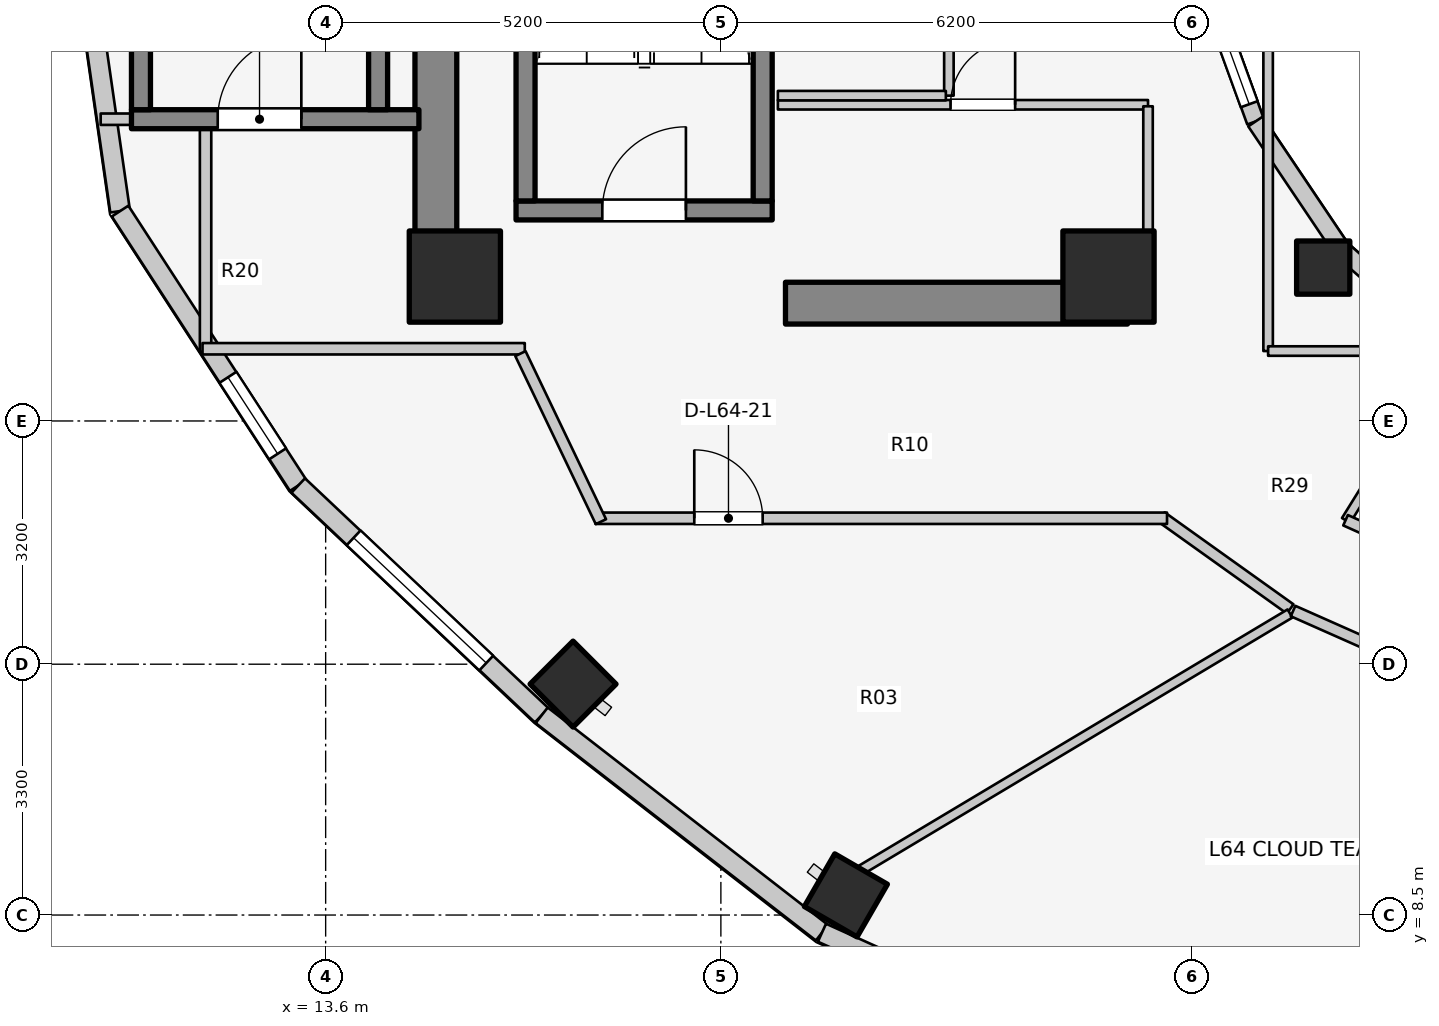
"""IFC4 building model, lengths in metres.
Left out: names, types, materials, properties, quantities, classifications, styles, units other than length and angle.
Written with IfcOpenShell. Run it as: python <this file> out.ifc"""

import sys

from ifc_helpers import new_model, si_unit, direction, frame, frame_2d, origin, origin_2d, place, context, subcontext, project, spatial, rectangle, extrude, element, fill, save


model = new_model("IFC4")
c1 = context("Model", 3, precision=1e-05, world=origin(), true_north=direction((0.0, 1.0)))
c2 = subcontext(c1, "Body", "Model", "MODEL_VIEW")
j1 = project(units=[si_unit("LENGTHUNIT", "METRE"), si_unit("PLANEANGLEUNIT", "RADIAN")], contexts=[c1])
p1 = place(None, origin())
s1 = spatial("IfcSite", under=j1, at=p1, CompositionType="ELEMENT")
p2 = place(p1, origin())
s2 = spatial("IfcBuilding", under=s1, at=p2, CompositionType="ELEMENT")
p3 = place(p2, frame((0.0, 0.0, 210.9)))
s3 = spatial("IfcBuildingStorey", under=s2, at=p3, CompositionType="ELEMENT", Elevation=210.9)
p4 = place(p3, frame((15.05, 17.05, 0.0), z_axis=(0.0, 0.0, 1.0), x_axis=(0.0, 1.0, 0.0)))
e1 = element("IfcWall", 1, at=p4, inside=s3, PredefinedType="SHEAR", context=c2, shape_type="SweptSolid", body=[
    extrude(rectangle(XDim=12.8, YDim=0.55, at=frame_2d((6.4, 0.0))), origin(), (0.0, 0.0, 1.0), 3.1),
])
p5 = place(p3, frame((19.65, 16.55, 0.0), z_axis=(0.0, 0.0, 1.0), x_axis=(1.0, 0.0, 0.0)))
e2 = element("IfcWall", 2, at=p5, inside=s3, PredefinedType="SHEAR", context=c2, shape_type="SweptSolid", body=[
    extrude(rectangle(XDim=4.5, YDim=0.55, at=frame_2d((2.25, 0.0))), origin(), (0.0, 0.0, 1.0), 3.1),
])
p6 = place(p3, frame((16.105, 17.77, 0.0), z_axis=(0.0, 0.0, 1.0), x_axis=(1.0, 0.0, 0.0)))
e3 = element("IfcWall", 3, at=p6, inside=s3, PredefinedType="SOLIDWALL", context=c2, shape_type="SweptSolid", body=[
    extrude(rectangle(XDim=3.37, YDim=0.25, at=frame_2d((1.685, 0.0))), origin(), (0.0, 0.0, 1.0), 3.1),
])
p7 = place(p6, frame((1.135, 0.0, 0.0)))
e4 = element("IfcOpeningElement", 4, at=p7, cuts=e3, PredefinedType="OPENING", context=c2, shape_type="SweptSolid", body=[
    extrude(rectangle(XDim=1.1, YDim=2.1, at=frame_2d((0.55, 1.05))), frame((0.0, 0.135, 0.0), z_axis=(0.0, -1.0, 0.0), x_axis=(1.0, 0.0, 0.0)), (0.0, 0.0, 1.0), 0.27),
])
for number, where, z_axis, x_axis in (
    (5, (16.23, 17.895, 0.0), (0.0, 0.0, 1.0), (0.0, 1.0, 0.0)),
    (6, (19.35, 17.895, 0.0), (0.0, 0.0, 1.0), (0.0, 1.0, 0.0)),
):
    element("IfcWall", number, at=place(p3, frame(where, z_axis=z_axis, x_axis=x_axis)), inside=s3, PredefinedType="SOLIDWALL", context=c2, shape_type="SweptSolid", body=[
        extrude(rectangle(XDim=7.81, YDim=0.25, at=frame_2d((3.905, 0.0))), origin(), (0.0, 0.0, 1.0), 3.1),
    ])
p8 = place(p3, frame((11.045, 18.97, 0.0), z_axis=(0.0, 0.0, 1.0), x_axis=(1.0, 0.0, 0.0)))
e7 = element("IfcWall", 7, at=p8, inside=s3, PredefinedType="SOLIDWALL", context=c2, shape_type="SweptSolid", body=[
    extrude(rectangle(XDim=3.782, YDim=0.25, at=frame_2d((1.891, 0.0))), origin(), (0.0, 0.0, 1.0), 3.1),
])
p9 = place(p8, frame((1.135, 0.0, 0.0)))
e8 = element("IfcOpeningElement", 8, at=p9, cuts=e7, PredefinedType="OPENING", context=c2, shape_type="SweptSolid", body=[
    extrude(rectangle(XDim=1.1, YDim=2.1, at=frame_2d((0.55, 1.05))), frame((0.0, 0.135, 0.0), z_axis=(0.0, -1.0, 0.0), x_axis=(1.0, 0.0, 0.0)), (0.0, 0.0, 1.0), 0.27),
])
for number, where, z_axis, x_axis in (
    (9, (11.17, 19.095, 0.0), (0.0, 0.0, 1.0), (0.0, 1.0, 0.0)),
    (10, (14.29, 19.095, 0.0), (0.0, 0.0, 1.0), (0.0, 1.0, 0.0)),
):
    element("IfcWall", number, at=place(p3, frame(where, z_axis=z_axis, x_axis=x_axis)), inside=s3, PredefinedType="SOLIDWALL", context=c2, shape_type="SweptSolid", body=[
        extrude(rectangle(XDim=7.81, YDim=0.25, at=frame_2d((3.905, 0.0))), origin(), (0.0, 0.0, 1.0), 3.1),
    ])
for number, where, z_axis, x_axis in (
    (11, (15.3, 16.9, 0.0), (0.0, 0.0, 1.0), (1.0, 0.0, 0.0)),
    (12, (23.9, 16.9, 0.0), (0.0, 0.0, 1.0), (1.0, 0.0, 0.0)),
):
    element("IfcColumn", number, at=place(p3, frame(where, z_axis=z_axis, x_axis=x_axis)), inside=s3, PredefinedType="COLUMN", context=c2, shape_type="SweptSolid", body=[
        extrude(rectangle(XDim=1.2, YDim=1.2, at=origin_2d()), origin(), (0.0, 0.0, 1.0), 3.1),
    ])
p10 = place(p3, frame((26.725, 17.018, 0.0), z_axis=(0.0, 0.0, 1.0), x_axis=(1.0, 0.0, 0.0)))
e13 = element("IfcColumn", 13, at=p10, inside=s3, PredefinedType="COLUMN", context=c2, shape_type="SweptSolid", body=[
    extrude(rectangle(XDim=0.7, YDim=0.7, at=origin_2d()), origin(), (0.0, 0.0, 1.0), 3.1),
])
for number, where, z_axis, x_axis in (
    (14, (16.855, 11.538, 0.0), (0.0, 0.0, 1.0), (-0.707, -0.707, 0.0)),
    (15, (20.445, 8.759, 0.0), (0.0, 0.0, 1.0), (-0.5, -0.866, 0.0)),
):
    element("IfcColumn", number, at=place(p3, frame(where, z_axis=z_axis, x_axis=x_axis)), inside=s3, PredefinedType="COLUMN", context=c2, shape_type="SweptSolid", body=[
        extrude(rectangle(XDim=0.8, YDim=0.8, at=origin_2d()), origin(), (0.0, 0.0, 1.0), 3.1),
    ])
p11 = place(p3, frame((25.123, 20.898, 0.0), z_axis=(0.0, 0.0, 1.0), x_axis=(0.341423187295, -0.93990968033, 0.0)))
e16 = element("IfcWall", 16, at=p11, inside=s3, PredefinedType="STANDARD", context=c2, shape_type="SweptSolid", body=[
    extrude(rectangle(XDim=2.084, YDim=0.23, at=frame_2d((1.042, 0.0))), origin(), (0.0, 0.0, 1.0), 2.84),
])
p12 = place(p11, frame((0.242, 0.0, 0.85)))
e17 = element("IfcOpeningElement", 17, at=p12, cuts=e16, PredefinedType="OPENING", context=c2, shape_type="SweptSolid", body=[
    extrude(rectangle(XDim=1.6, YDim=1.65, at=frame_2d((0.8, 0.825))), frame((0.0, 0.125, 0.0), z_axis=(0.0, -1.0, 0.0), x_axis=(1.0, 0.0, 0.0)), (0.0, 0.0, 1.0), 0.25),
])
p13 = place(p3, frame((25.834, 18.94, 0.0), z_axis=(0.0, 0.0, 1.0), x_axis=(0.558197800898, -0.829707909492, 0.0)))
e18 = element("IfcWall", 18, at=p13, inside=s3, PredefinedType="STANDARD", context=c2, shape_type="SweptSolid", body=[
    extrude(rectangle(XDim=2.027, YDim=0.23, at=frame_2d((1.013, 0.0))), origin(), (0.0, 0.0, 1.0), 2.16),
])
p14 = place(p3, frame((26.965, 17.258, 0.0), z_axis=(0.0, 0.0, 1.0), x_axis=(0.752576694707, -0.658504607869, 0.0)))
e19 = element("IfcWall", 19, at=p14, inside=s3, PredefinedType="STANDARD", context=c2, shape_type="SweptSolid", body=[
    extrude(rectangle(XDim=1.959, YDim=0.23, at=frame_2d((0.98, 0.0))), origin(), (0.0, 0.0, 1.0), 2.16),
])
p15 = place(p3, frame((10.14, 23.0, 0.0), z_axis=(0.0, 0.0, 1.0), x_axis=(0.142712754019, -0.989764148593, 0.0)))
e20 = element("IfcWall", 20, at=p15, inside=s3, PredefinedType="STANDARD", context=c2, shape_type="SweptSolid", body=[
    extrude(rectangle(XDim=5.293, YDim=0.26, at=frame_2d((2.646, 0.0))), origin(), (0.0, 0.0, 1.0), 2.85),
])
p16 = place(p15, frame((1.458, 0.0, 0.75)))
e21 = element("IfcOpeningElement", 21, at=p16, cuts=e20, PredefinedType="OPENING", context=c2, shape_type="SweptSolid", body=[
    extrude(rectangle(XDim=1.2, YDim=1.5, at=frame_2d((0.6, 0.75))), frame((0.0, 0.14, 0.0), z_axis=(0.0, -1.0, 0.0), x_axis=(1.0, 0.0, 0.0)), (0.0, 0.0, 1.0), 0.28),
])
p17 = place(p3, frame((10.895, 17.761, 0.0), z_axis=(0.0, 0.0, 1.0), x_axis=(0.544475908819, -0.838776480784, 0.0)))
e22 = element("IfcWall", 22, at=p17, inside=s3, PredefinedType="STANDARD", context=c2, shape_type="SweptSolid", body=[
    extrude(rectangle(XDim=4.305, YDim=0.26, at=frame_2d((2.152, 0.0))), origin(), (0.0, 0.0, 1.0), 2.85),
])
p18 = place(p17, frame((2.607, 0.0, 0.75)))
e23 = element("IfcOpeningElement", 23, at=p18, cuts=e22, PredefinedType="OPENING", context=c2, shape_type="SweptSolid", body=[
    extrude(rectangle(XDim=1.2, YDim=1.5, at=frame_2d((0.6, 0.75))), frame((0.0, 0.14, 0.0), z_axis=(0.0, -1.0, 0.0), x_axis=(1.0, 0.0, 0.0)), (0.0, 0.0, 1.0), 0.28),
])
p19 = place(p3, frame((13.239, 14.151, 0.0), z_axis=(0.0, 0.0, 1.0), x_axis=(0.72731899451, -0.686299555752, 0.0)))
e24 = element("IfcWall", 24, at=p19, inside=s3, PredefinedType="STANDARD", context=c2, shape_type="SweptSolid", body=[
    extrude(rectangle(XDim=4.404, YDim=0.26, at=frame_2d((2.202, 0.0))), origin(), (0.0, 0.0, 1.0), 2.85),
])
p20 = place(p19, frame((1.002, 0.0, 0.75)))
e25 = element("IfcOpeningElement", 25, at=p20, cuts=e24, PredefinedType="OPENING", context=c2, shape_type="SweptSolid", body=[
    extrude(rectangle(XDim=2.4, YDim=1.7, at=frame_2d((1.2, 0.85))), frame((0.0, 0.14, 0.0), z_axis=(0.0, -1.0, 0.0), x_axis=(1.0, 0.0, 0.0)), (0.0, 0.0, 1.0), 0.28),
])
p21 = place(p3, frame((16.442, 11.128, 0.0), z_axis=(0.0, 0.0, 1.0), x_axis=(0.790126214723, -0.612944177563, 0.0)))
e26 = element("IfcWall", 26, at=p21, inside=s3, PredefinedType="STANDARD", context=c2, shape_type="SweptSolid", body=[
    extrude(rectangle(XDim=4.667, YDim=0.26, at=frame_2d((2.333, 0.0))), origin(), (0.0, 0.0, 1.0), 2.85),
])
p22 = place(p3, frame((20.13, 8.267, 0.0), z_axis=(0.0, 0.0, 1.0), x_axis=(0.911427484938, -0.411460738952, 0.0)))
e27 = element("IfcWall", 27, at=p22, inside=s3, PredefinedType="STANDARD", context=c2, shape_type="SweptSolid", body=[
    extrude(rectangle(XDim=5.296, YDim=0.26, at=frame_2d((2.648, 0.0))), origin(), (0.0, 0.0, 1.0), 2.85),
])
p23 = place(p22, frame((1.898, 0.0, 0.75)))
e28 = element("IfcOpeningElement", 28, at=p23, cuts=e27, PredefinedType="OPENING", context=c2, shape_type="SweptSolid", body=[
    extrude(rectangle(XDim=1.5, YDim=1.6, at=frame_2d((0.75, 0.8))), frame((0.0, 0.14, 0.0), z_axis=(0.0, -1.0, 0.0), x_axis=(1.0, 0.0, 0.0)), (0.0, 0.0, 1.0), 0.28),
])
p24 = place(p3, frame((19.55, 19.16, 0.0), z_axis=(0.0, 0.0, 1.0), x_axis=(1.0, 0.0, 0.0)))
e29 = element("IfcWall", 29, at=p24, inside=s3, PredefinedType="PARTITIONING", context=c2, shape_type="SweptSolid", body=[
    extrude(rectangle(XDim=4.87, YDim=0.125, at=frame_2d((2.435, 0.0))), origin(), (0.0, 0.0, 1.0), 2.12),
])
p25 = place(p24, frame((2.272, 0.0, 0.0)))
e30 = element("IfcOpeningElement", 30, at=p25, cuts=e29, PredefinedType="OPENING", context=c2, shape_type="SweptSolid", body=[
    extrude(rectangle(XDim=0.85, YDim=2.05, at=frame_2d((0.425, 1.025))), frame((0.0, 0.073, 0.0), z_axis=(0.0, -1.0, 0.0), x_axis=(1.0, 0.0, 0.0)), (0.0, 0.0, 1.0), 0.145),
])
p26 = place(p3, frame((24.42, 17.1, 0.0), z_axis=(0.0, 0.0, 1.0), x_axis=(0.0, 1.0, 0.0)))
e31 = element("IfcWall", 31, at=p26, inside=s3, PredefinedType="PARTITIONING", context=c2, shape_type="SweptSolid", body=[
    extrude(rectangle(XDim=2.04, YDim=0.125, at=frame_2d((1.02, 0.0))), origin(), (0.0, 0.0, 1.0), 2.232),
])
p27 = place(p3, frame((21.8, 19.28, 0.0), z_axis=(0.0, 0.0, 1.0), x_axis=(0.0, 1.0, 0.0)))
e32 = element("IfcWall", 32, at=p27, inside=s3, PredefinedType="PARTITIONING", context=c2, shape_type="SweptSolid", body=[
    extrude(rectangle(XDim=2.4, YDim=0.125, at=frame_2d((1.2, 0.0))), origin(), (0.0, 0.0, 1.0), 2.855),
])
p28 = place(p27, frame((0.7, 0.0, 0.0)))
e33 = element("IfcOpeningElement", 33, at=p28, cuts=e32, PredefinedType="OPENING", context=c2, shape_type="SweptSolid", body=[
    extrude(rectangle(XDim=0.85, YDim=2.05, at=frame_2d((0.425, 1.025))), frame((0.0, 0.073, 0.0), z_axis=(0.0, -1.0, 0.0), x_axis=(1.0, 0.0, 0.0)), (0.0, 0.0, 1.0), 0.145),
])
p29 = place(p3, frame((19.55, 19.28, 0.0), z_axis=(0.0, 0.0, 1.0), x_axis=(1.0, 0.0, 0.0)))
e34 = element("IfcWall", 34, at=p29, inside=s3, PredefinedType="PARTITIONING", context=c2, shape_type="SweptSolid", body=[
    extrude(rectangle(XDim=2.21, YDim=0.125, at=frame_2d((1.105, 0.0))), origin(), (0.0, 0.0, 1.0), 2.12),
])
p30 = place(p3, frame((28.45, 15.985, 0.0), z_axis=(0.0, 0.0, 1.0), x_axis=(-0.527527080983, -0.849538215049, 0.0)))
e35 = element("IfcWall", 35, at=p30, inside=s3, PredefinedType="PARTITIONING", context=c2, shape_type="SweptSolid", body=[
    extrude(rectangle(XDim=2.701, YDim=0.125, at=frame_2d((1.351, 0.0))), origin(), (0.0, 0.0, 1.0), 2.376),
])
p31 = place(p3, frame((27.019, 13.694, 0.0), z_axis=(0.0, 0.0, 1.0), x_axis=(0.912628408652, -0.408790151203, 0.0)))
e36 = element("IfcWall", 36, at=p31, inside=s3, PredefinedType="PARTITIONING", context=c2, shape_type="SweptSolid", body=[
    extrude(rectangle(XDim=2.638, YDim=0.15, at=frame_2d((1.319, 0.0))), origin(), (0.0, 0.0, 1.0), 2.376),
])
p32 = place(p3, frame((26.0, 15.92, 0.0), z_axis=(0.0, 0.0, 1.0), x_axis=(0.0, 1.0, 0.0)))
e37 = element("IfcWall", 37, at=p32, inside=s3, PredefinedType="PARTITIONING", context=c2, shape_type="SweptSolid", body=[
    extrude(rectangle(XDim=4.28, YDim=0.125, at=frame_2d((2.14, 0.0))), origin(), (0.0, 0.0, 1.0), 2.232),
])
p33 = place(p3, frame((26.0, 15.92, 0.0), z_axis=(0.0, 0.0, 1.0), x_axis=(1.0, 0.0, 0.0)))
e38 = element("IfcWall", 38, at=p33, inside=s3, PredefinedType="PARTITIONING", context=c2, shape_type="SweptSolid", body=[
    extrude(rectangle(XDim=2.6, YDim=0.125, at=frame_2d((1.3, 0.0))), origin(), (0.0, 0.0, 1.0), 2.232),
])
p34 = place(p3, frame((10.64, 18.97, 0.0), z_axis=(0.0, 0.0, 1.0), x_axis=(1.0, 0.0, 0.0)))
e39 = element("IfcWall", 39, at=p34, inside=s3, PredefinedType="PARTITIONING", context=c2, shape_type="SweptSolid", body=[
    extrude(rectangle(XDim=0.4, YDim=0.15, at=frame_2d((0.2, 0.0))), origin(), (0.0, 0.0, 1.0), 2.855),
])
p35 = place(p3, frame((12.02, 15.91, 0.0), z_axis=(0.0, 0.0, 1.0), x_axis=(0.0, 1.0, 0.0)))
e40 = element("IfcWall", 40, at=p35, inside=s3, PredefinedType="PARTITIONING", context=c2, shape_type="SweptSolid", body=[
    extrude(rectangle(XDim=2.93, YDim=0.15, at=frame_2d((1.465, 0.0))), origin(), (0.0, 0.0, 1.0), 2.855),
])
p36 = place(p3, frame((11.98, 15.95, 0.0), z_axis=(0.0, 0.0, 1.0), x_axis=(1.0, 0.0, 0.0)))
e41 = element("IfcWall", 41, at=p36, inside=s3, PredefinedType="PARTITIONING", context=c2, shape_type="SweptSolid", body=[
    extrude(rectangle(XDim=4.24, YDim=0.15, at=frame_2d((2.12, 0.0))), origin(), (0.0, 0.0, 1.0), 2.22),
])
p37 = place(p3, frame((26.29, 12.527, 0.0), z_axis=(0.0, 0.0, 1.0), x_axis=(-0.813780999276, 0.581171648669, 0.0)))
e42 = element("IfcWall", 42, at=p37, inside=s3, PredefinedType="PARTITIONING", context=c2, shape_type="SweptSolid", body=[
    extrude(rectangle(XDim=2.082, YDim=0.15, at=frame_2d((1.041, 0.0))), origin(), (0.0, 0.0, 1.0), 2.376),
])
p38 = place(p3, frame((17.15, 13.72, 0.0), z_axis=(0.0, 0.0, 1.0), x_axis=(1.0, 0.0, 0.0)))
e43 = element("IfcWall", 43, at=p38, inside=s3, PredefinedType="PARTITIONING", context=c2, shape_type="SweptSolid", body=[
    extrude(rectangle(XDim=7.52, YDim=0.15, at=frame_2d((3.76, 0.0))), origin(), (0.0, 0.0, 1.0), 2.376),
])
p39 = place(p38, frame((1.3, 0.0, 0.0)))
e44 = element("IfcOpeningElement", 44, at=p39, cuts=e43, PredefinedType="OPENING", context=c2, shape_type="SweptSolid", body=[
    extrude(rectangle(XDim=0.9, YDim=2.1, at=frame_2d((0.45, 1.05))), frame((0.0, 0.085, 0.0), z_axis=(0.0, -1.0, 0.0), x_axis=(1.0, 0.0, 0.0)), (0.0, 0.0, 1.0), 0.17),
])
p40 = place(p3, frame((17.222, 13.675, 0.0), z_axis=(0.0, 0.0, 1.0), x_axis=(-0.431973389813, 0.901886351207, 0.0)))
e45 = element("IfcWall", 45, at=p40, inside=s3, PredefinedType="PARTITIONING", context=c2, shape_type="SweptSolid", body=[
    extrude(rectangle(XDim=2.452, YDim=0.15, at=frame_2d((1.226, 0.0))), origin(), (0.0, 0.0, 1.0), 2.855),
])
p41 = place(p3, frame((26.288, 12.467, 0.0), z_axis=(0.0, 0.0, 1.0), x_axis=(-0.858332411245, -0.513094018487, 0.0)))
e46 = element("IfcWall", 46, at=p41, inside=s3, PredefinedType="PARTITIONING", context=c2, shape_type="SweptSolid", body=[
    extrude(rectangle(XDim=6.586, YDim=0.125, at=frame_2d((3.293, 0.0))), origin(), (0.0, 0.0, 1.0), 2.376),
])
p42 = place(p3, frame((26.328, 12.499, 0.0), z_axis=(0.0, 0.0, 1.0), x_axis=(0.914139569865, -0.405399613724, 0.0)))
e47 = element("IfcWall", 47, at=p42, inside=s3, PredefinedType="PARTITIONING", context=c2, shape_type="SweptSolid", body=[
    extrude(rectangle(XDim=3.005, YDim=0.15, at=frame_2d((1.502, 0.0))), origin(), (0.0, 0.0, 1.0), 2.376),
])
p43 = place(p12, origin())
e48 = element("IfcWindow", 48, at=p43, inside=s3, PartitioningType="SINGLE_PANEL", PredefinedType="WINDOW", context=c2, shape_type="SweptSolid", body=[
    extrude(rectangle(XDim=1.6, YDim=1.65, at=frame_2d((0.8, 0.825))), frame((0.0, 0.03, 0.0), z_axis=(0.0, -1.0, 0.0), x_axis=(1.0, 0.0, 0.0)), (0.0, 0.0, 1.0), 0.06),
])
fill(e17, e48)
p44 = place(p18, origin())
e49 = element("IfcWindow", 49, at=p44, inside=s3, PartitioningType="SINGLE_PANEL", PredefinedType="WINDOW", context=c2, shape_type="SweptSolid", body=[
    extrude(rectangle(XDim=1.2, YDim=1.5, at=frame_2d((0.6, 0.75))), frame((0.0, 0.03, 0.0), z_axis=(0.0, -1.0, 0.0), x_axis=(1.0, 0.0, 0.0)), (0.0, 0.0, 1.0), 0.06),
])
fill(e23, e49)
p45 = place(p20, origin())
e50 = element("IfcWindow", 50, at=p45, inside=s3, PartitioningType="SINGLE_PANEL", PredefinedType="WINDOW", context=c2, shape_type="SweptSolid", body=[
    extrude(rectangle(XDim=2.4, YDim=1.7, at=frame_2d((1.2, 0.85))), frame((0.0, 0.03, 0.0), z_axis=(0.0, -1.0, 0.0), x_axis=(1.0, 0.0, 0.0)), (0.0, 0.0, 1.0), 0.06),
])
fill(e25, e50)
p46 = place(p7, origin())
e51 = element("IfcDoor", 51, at=p46, inside=s3, OperationType="SINGLE_SWING_RIGHT", PredefinedType="DOOR", context=c2, shape_type="SweptSolid", body=[
    extrude(rectangle(XDim=1.1, YDim=2.1, at=frame_2d((0.55, 1.05))), frame((0.0, 0.025, 0.0), z_axis=(0.0, -1.0, 0.0), x_axis=(1.0, 0.0, 0.0)), (0.0, 0.0, 1.0), 0.05),
])
fill(e4, e51)
p47 = place(p9, origin())
e52 = element("IfcDoor", 52, at=p47, inside=s3, OperationType="SINGLE_SWING_RIGHT", PredefinedType="DOOR", context=c2, shape_type="SweptSolid", body=[
    extrude(rectangle(XDim=1.1, YDim=2.1, at=frame_2d((0.55, 1.05))), frame((0.0, 0.025, 0.0), z_axis=(0.0, -1.0, 0.0), x_axis=(1.0, 0.0, 0.0)), (0.0, 0.0, 1.0), 0.05),
])
fill(e8, e52)
p48 = place(p25, origin())
e53 = element("IfcDoor", 53, at=p48, inside=s3, OperationType="SINGLE_SWING_RIGHT", PredefinedType="DOOR", context=c2, shape_type="SweptSolid", body=[
    extrude(rectangle(XDim=0.85, YDim=2.05, at=frame_2d((0.425, 1.025))), frame((0.0, 0.025, 0.0), z_axis=(0.0, -1.0, 0.0), x_axis=(1.0, 0.0, 0.0)), (0.0, 0.0, 1.0), 0.05),
])
fill(e30, e53)
p49 = place(p39, origin())
e54 = element("IfcDoor", 54, at=p49, inside=s3, OperationType="SINGLE_SWING_LEFT", PredefinedType="DOOR", context=c2, shape_type="SweptSolid", body=[
    extrude(rectangle(XDim=0.9, YDim=2.1, at=frame_2d((0.45, 1.05))), frame((0.0, 0.025, 0.0), z_axis=(0.0, -1.0, 0.0), x_axis=(1.0, 0.0, 0.0)), (0.0, 0.0, 1.0), 0.05),
])
fill(e44, e54)
save(model, sys.argv[1])
